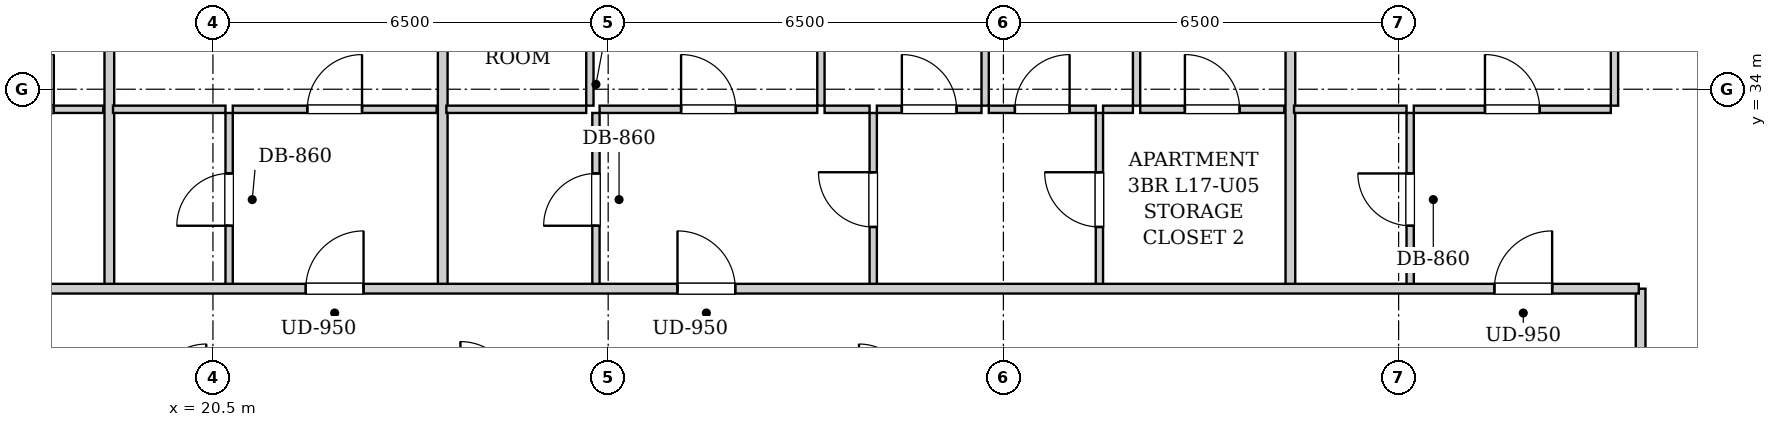
"""IFC4 building model, lengths in metres.
Left out: names, types, materials, properties, quantities, classifications, styles, units other than length and angle.
Written with IfcOpenShell. Run it as: python <this file> out.ifc"""

import sys

from ifc_helpers import new_model, si_unit, direction, frame, frame_2d, origin, place, context, subcontext, project, spatial, rectangle, extrude, element, fill, save


model = new_model("IFC4")
c1 = context("Model", 3, precision=1e-05, world=origin(), true_north=direction((0.0, 1.0)))
c2 = subcontext(c1, "Body", "Model", "MODEL_VIEW")
j1 = project(units=[si_unit("LENGTHUNIT", "METRE"), si_unit("PLANEANGLEUNIT", "RADIAN")], contexts=[c1])
p1 = place(None, origin())
s1 = spatial("IfcSite", under=j1, at=p1, CompositionType="ELEMENT")
p2 = place(p1, origin())
s2 = spatial("IfcBuilding", under=s1, at=p2, CompositionType="ELEMENT")
p3 = place(p2, frame((0.0, 0.0, 64.2)))
s3 = spatial("IfcBuildingStorey", under=s2, at=p3, CompositionType="ELEMENT", Elevation=64.2)
p4 = place(p3, frame((43.98, 28.98, 0.0), z_axis=(0.0, 0.0, 1.0), x_axis=(0.0, 1.0, 0.0)))
e1 = element("IfcWall", 1, at=p4, inside=s3, PredefinedType="PARTITIONING", context=c2, shape_type="SweptSolid", body=[
    extrude(rectangle(XDim=1.74, YDim=0.16, at=frame_2d((0.87, 0.0))), origin(), (0.0, 0.0, 1.0), 2.94),
])
p5 = place(p3, frame((16.17, 33.67, 0.0), z_axis=(0.0, 0.0, 1.0), x_axis=(1.0, 0.0, 0.0)))
e2 = element("IfcWall", 2, at=p5, inside=s3, PredefinedType="PARTITIONING", context=c2, shape_type="SweptSolid", body=[
    extrude(rectangle(XDim=2.526, YDim=0.12, at=frame_2d((1.263, 0.0))), origin(), (0.0, 0.0, 1.0), 2.94),
])
p6 = place(p5, frame((0.813, 0.0, 0.0)))
e3 = element("IfcOpeningElement", 3, at=p6, cuts=e2, PredefinedType="OPENING", context=c2, shape_type="SweptSolid", body=[
    extrude(rectangle(XDim=0.9, YDim=2.05, at=frame_2d((0.45, 1.025))), frame((0.0, 0.07, 0.0), z_axis=(0.0, -1.0, 0.0), x_axis=(1.0, 0.0, 0.0)), (0.0, 0.0, 1.0), 0.14),
])
p7 = place(p3, frame((18.796, 30.76, 0.0), z_axis=(0.0, 0.0, 1.0), x_axis=(0.0, 1.0, 0.0)))
e4 = element("IfcWall", 4, at=p7, inside=s3, PredefinedType="PARTITIONING", context=c2, shape_type="SweptSolid", body=[
    extrude(rectangle(XDim=16.56, YDim=0.16, at=frame_2d((8.28, 0.0))), origin(), (0.0, 0.0, 1.0), 2.94),
])
p8 = place(p3, frame((20.766, 30.76, 0.0), z_axis=(0.0, 0.0, 1.0), x_axis=(0.0, 1.0, 0.0)))
e5 = element("IfcWall", 5, at=p8, inside=s3, PredefinedType="PARTITIONING", context=c2, shape_type="SweptSolid", body=[
    extrude(rectangle(XDim=2.85, YDim=0.12, at=frame_2d((1.425, 0.0))), origin(), (0.0, 0.0, 1.0), 2.94),
])
p9 = place(p8, frame((0.995, 0.0, 0.0)))
e6 = element("IfcOpeningElement", 6, at=p9, cuts=e5, PredefinedType="OPENING", context=c2, shape_type="SweptSolid", body=[
    extrude(rectangle(XDim=0.86, YDim=2.05, at=frame_2d((0.43, 1.025))), frame((0.0, 0.07, 0.0), z_axis=(0.0, -1.0, 0.0), x_axis=(1.0, 0.0, 0.0)), (0.0, 0.0, 1.0), 0.14),
])
p10 = place(p3, frame((18.856, 33.67, 0.0), z_axis=(0.0, 0.0, 1.0), x_axis=(1.0, 0.0, 0.0)))
e7 = element("IfcWall", 7, at=p10, inside=s3, PredefinedType="PARTITIONING", context=c2, shape_type="SweptSolid", body=[
    extrude(rectangle(XDim=1.85, YDim=0.12, at=frame_2d((0.925, 0.0))), origin(), (0.0, 0.0, 1.0), 2.94),
])
p11 = place(p3, frame((20.826, 33.67, 0.0), z_axis=(0.0, 0.0, 1.0), x_axis=(1.0, 0.0, 0.0)))
e8 = element("IfcWall", 8, at=p11, inside=s3, PredefinedType="PARTITIONING", context=c2, shape_type="SweptSolid", body=[
    extrude(rectangle(XDim=3.353, YDim=0.12, at=frame_2d((1.677, 0.0))), origin(), (0.0, 0.0, 1.0), 2.94),
])
p12 = place(p11, frame((1.226, 0.0, 0.0)))
e9 = element("IfcOpeningElement", 9, at=p12, cuts=e8, PredefinedType="OPENING", context=c2, shape_type="SweptSolid", body=[
    extrude(rectangle(XDim=0.9, YDim=2.05, at=frame_2d((0.45, 1.025))), frame((0.0, 0.07, 0.0), z_axis=(0.0, -1.0, 0.0), x_axis=(1.0, 0.0, 0.0)), (0.0, 0.0, 1.0), 0.14),
])
p13 = place(p3, frame((24.279, 30.76, 0.0), z_axis=(0.0, 0.0, 1.0), x_axis=(0.0, 1.0, 0.0)))
e10 = element("IfcWall", 10, at=p13, inside=s3, PredefinedType="PARTITIONING", context=c2, shape_type="SweptSolid", body=[
    extrude(rectangle(XDim=16.56, YDim=0.16, at=frame_2d((8.28, 0.0))), origin(), (0.0, 0.0, 1.0), 2.94),
])
p14 = place(p3, frame((26.799, 30.76, 0.0), z_axis=(0.0, 0.0, 1.0), x_axis=(0.0, 1.0, 0.0)))
e11 = element("IfcWall", 11, at=p14, inside=s3, PredefinedType="PARTITIONING", context=c2, shape_type="SweptSolid", body=[
    extrude(rectangle(XDim=2.85, YDim=0.12, at=frame_2d((1.425, 0.0))), origin(), (0.0, 0.0, 1.0), 2.94),
])
p15 = place(p14, frame((0.995, 0.0, 0.0)))
e12 = element("IfcOpeningElement", 12, at=p15, cuts=e11, PredefinedType="OPENING", context=c2, shape_type="SweptSolid", body=[
    extrude(rectangle(XDim=0.86, YDim=2.05, at=frame_2d((0.43, 1.025))), frame((0.0, 0.07, 0.0), z_axis=(0.0, -1.0, 0.0), x_axis=(1.0, 0.0, 0.0)), (0.0, 0.0, 1.0), 0.14),
])
p16 = place(p3, frame((24.339, 33.67, 0.0), z_axis=(0.0, 0.0, 1.0), x_axis=(1.0, 0.0, 0.0)))
e13 = element("IfcWall", 13, at=p16, inside=s3, PredefinedType="PARTITIONING", context=c2, shape_type="SweptSolid", body=[
    extrude(rectangle(XDim=2.3, YDim=0.12, at=frame_2d((1.15, 0.0))), origin(), (0.0, 0.0, 1.0), 2.94),
])
p17 = place(p3, frame((31.359, 30.76, 0.0), z_axis=(0.0, 0.0, 1.0), x_axis=(0.0, 1.0, 0.0)))
e14 = element("IfcWall", 14, at=p17, inside=s3, PredefinedType="PARTITIONING", context=c2, shape_type="SweptSolid", body=[
    extrude(rectangle(XDim=2.85, YDim=0.12, at=frame_2d((1.425, 0.0))), origin(), (0.0, 0.0, 1.0), 2.94),
])
p18 = place(p17, frame((0.975, 0.0, 0.0)))
e15 = element("IfcOpeningElement", 15, at=p18, cuts=e14, PredefinedType="OPENING", context=c2, shape_type="SweptSolid", body=[
    extrude(rectangle(XDim=0.9, YDim=2.05, at=frame_2d((0.45, 1.025))), frame((0.0, 0.07, 0.0), z_axis=(0.0, -1.0, 0.0), x_axis=(1.0, 0.0, 0.0)), (0.0, 0.0, 1.0), 0.14),
])
p19 = place(p3, frame((26.859, 33.67, 0.0), z_axis=(0.0, 0.0, 1.0), x_axis=(1.0, 0.0, 0.0)))
e16 = element("IfcWall", 16, at=p19, inside=s3, PredefinedType="PARTITIONING", context=c2, shape_type="SweptSolid", body=[
    extrude(rectangle(XDim=3.58, YDim=0.12, at=frame_2d((1.79, 0.0))), origin(), (0.0, 0.0, 1.0), 2.94),
])
p20 = place(p19, frame((1.34, 0.0, 0.0)))
e17 = element("IfcOpeningElement", 17, at=p20, cuts=e16, PredefinedType="OPENING", context=c2, shape_type="SweptSolid", body=[
    extrude(rectangle(XDim=0.9, YDim=2.05, at=frame_2d((0.45, 1.025))), frame((0.0, 0.07, 0.0), z_axis=(0.0, -1.0, 0.0), x_axis=(1.0, 0.0, 0.0)), (0.0, 0.0, 1.0), 0.14),
])
p21 = place(p3, frame((30.559, 33.67, 0.0), z_axis=(0.0, 0.0, 1.0), x_axis=(1.0, 0.0, 0.0)))
e18 = element("IfcWall", 18, at=p21, inside=s3, PredefinedType="PARTITIONING", context=c2, shape_type="SweptSolid", body=[
    extrude(rectangle(XDim=0.74, YDim=0.12, at=frame_2d((0.37, 0.0))), origin(), (0.0, 0.0, 1.0), 2.94),
])
p22 = place(p3, frame((35.079, 30.76, 0.0), z_axis=(0.0, 0.0, 1.0), x_axis=(0.0, 1.0, 0.0)))
e19 = element("IfcWall", 19, at=p22, inside=s3, PredefinedType="PARTITIONING", context=c2, shape_type="SweptSolid", body=[
    extrude(rectangle(XDim=2.85, YDim=0.12, at=frame_2d((1.425, 0.0))), origin(), (0.0, 0.0, 1.0), 2.94),
])
p23 = place(p22, frame((0.975, 0.0, 0.0)))
e20 = element("IfcOpeningElement", 20, at=p23, cuts=e19, PredefinedType="OPENING", context=c2, shape_type="SweptSolid", body=[
    extrude(rectangle(XDim=0.9, YDim=2.05, at=frame_2d((0.45, 1.025))), frame((0.0, 0.07, 0.0), z_axis=(0.0, -1.0, 0.0), x_axis=(1.0, 0.0, 0.0)), (0.0, 0.0, 1.0), 0.14),
])
p24 = place(p3, frame((31.419, 33.67, 0.0), z_axis=(0.0, 0.0, 1.0), x_axis=(1.0, 0.0, 0.0)))
e21 = element("IfcWall", 21, at=p24, inside=s3, PredefinedType="PARTITIONING", context=c2, shape_type="SweptSolid", body=[
    extrude(rectangle(XDim=1.721, YDim=0.12, at=frame_2d((0.86, 0.0))), origin(), (0.0, 0.0, 1.0), 2.94),
])
p25 = place(p24, frame((0.411, 0.0, 0.0)))
e22 = element("IfcOpeningElement", 22, at=p25, cuts=e21, PredefinedType="OPENING", context=c2, shape_type="SweptSolid", body=[
    extrude(rectangle(XDim=0.9, YDim=2.05, at=frame_2d((0.45, 1.025))), frame((0.0, 0.07, 0.0), z_axis=(0.0, -1.0, 0.0), x_axis=(1.0, 0.0, 0.0)), (0.0, 0.0, 1.0), 0.14),
])
p26 = place(p3, frame((33.26, 33.67, 0.0), z_axis=(0.0, 0.0, 1.0), x_axis=(1.0, 0.0, 0.0)))
e23 = element("IfcWall", 23, at=p26, inside=s3, PredefinedType="PARTITIONING", context=c2, shape_type="SweptSolid", body=[
    extrude(rectangle(XDim=1.759, YDim=0.12, at=frame_2d((0.879, 0.0))), origin(), (0.0, 0.0, 1.0), 2.94),
])
p27 = place(p26, frame((0.429, 0.0, 0.0)))
e24 = element("IfcOpeningElement", 24, at=p27, cuts=e23, PredefinedType="OPENING", context=c2, shape_type="SweptSolid", body=[
    extrude(rectangle(XDim=0.9, YDim=2.05, at=frame_2d((0.45, 1.025))), frame((0.0, 0.07, 0.0), z_axis=(0.0, -1.0, 0.0), x_axis=(1.0, 0.0, 0.0)), (0.0, 0.0, 1.0), 0.14),
])
p28 = place(p3, frame((35.139, 33.67, 0.0), z_axis=(0.0, 0.0, 1.0), x_axis=(1.0, 0.0, 0.0)))
e25 = element("IfcWall", 25, at=p28, inside=s3, PredefinedType="PARTITIONING", context=c2, shape_type="SweptSolid", body=[
    extrude(rectangle(XDim=0.491, YDim=0.12, at=frame_2d((0.246, 0.0))), origin(), (0.0, 0.0, 1.0), 2.94),
])
p29 = place(p3, frame((35.75, 33.67, 0.0), z_axis=(0.0, 0.0, 1.0), x_axis=(1.0, 0.0, 0.0)))
e26 = element("IfcWall", 26, at=p29, inside=s3, PredefinedType="PARTITIONING", context=c2, shape_type="SweptSolid", body=[
    extrude(rectangle(XDim=2.37, YDim=0.12, at=frame_2d((1.185, 0.0))), origin(), (0.0, 0.0, 1.0), 2.94),
])
p30 = place(p29, frame((0.735, 0.0, 0.0)))
e27 = element("IfcOpeningElement", 27, at=p30, cuts=e26, PredefinedType="OPENING", context=c2, shape_type="SweptSolid", body=[
    extrude(rectangle(XDim=0.9, YDim=2.05, at=frame_2d((0.45, 1.025))), frame((0.0, 0.07, 0.0), z_axis=(0.0, -1.0, 0.0), x_axis=(1.0, 0.0, 0.0)), (0.0, 0.0, 1.0), 0.14),
])
p31 = place(p3, frame((26.699, 33.73, 0.0), z_axis=(0.0, 0.0, 1.0), x_axis=(0.0, 1.0, 0.0)))
e28 = element("IfcWall", 28, at=p31, inside=s3, PredefinedType="PARTITIONING", context=c2, shape_type="SweptSolid", body=[
    extrude(rectangle(XDim=13.59, YDim=0.12, at=frame_2d((6.795, 0.0))), origin(), (0.0, 0.0, 1.0), 2.94),
])
p32 = place(p31, frame((6.33, 0.0, 0.0)))
e29 = element("IfcOpeningElement", 29, at=p32, cuts=e28, PredefinedType="OPENING", context=c2, shape_type="SweptSolid", body=[
    extrude(rectangle(XDim=0.9, YDim=2.05, at=frame_2d((0.45, 1.025))), frame((0.0, 0.07, 0.0), z_axis=(0.0, -1.0, 0.0), x_axis=(1.0, 0.0, 0.0)), (0.0, 0.0, 1.0), 0.14),
])
p33 = place(p3, frame((30.499, 33.73, 0.0), z_axis=(0.0, 0.0, 1.0), x_axis=(0.0, 1.0, 0.0)))
e30 = element("IfcWall", 30, at=p33, inside=s3, PredefinedType="PARTITIONING", context=c2, shape_type="SweptSolid", body=[
    extrude(rectangle(XDim=13.59, YDim=0.12, at=frame_2d((6.795, 0.0))), origin(), (0.0, 0.0, 1.0), 2.94),
])
p34 = place(p33, frame((6.33, 0.0, 0.0)))
e31 = element("IfcOpeningElement", 31, at=p34, cuts=e30, PredefinedType="OPENING", context=c2, shape_type="SweptSolid", body=[
    extrude(rectangle(XDim=0.9, YDim=2.05, at=frame_2d((0.45, 1.025))), frame((0.0, 0.07, 0.0), z_axis=(0.0, -1.0, 0.0), x_axis=(1.0, 0.0, 0.0)), (0.0, 0.0, 1.0), 0.14),
])
p35 = place(p3, frame((33.2, 33.73, 0.0), z_axis=(0.0, 0.0, 1.0), x_axis=(0.0, 1.0, 0.0)))
e32 = element("IfcWall", 32, at=p35, inside=s3, PredefinedType="PARTITIONING", context=c2, shape_type="SweptSolid", body=[
    extrude(rectangle(XDim=13.59, YDim=0.12, at=frame_2d((6.795, 0.0))), origin(), (0.0, 0.0, 1.0), 2.232),
])
p36 = place(p35, frame((6.33, 0.0, 0.0)))
e33 = element("IfcOpeningElement", 33, at=p36, cuts=e32, PredefinedType="OPENING", context=c2, shape_type="SweptSolid", body=[
    extrude(rectangle(XDim=0.9, YDim=2.05, at=frame_2d((0.45, 1.025))), frame((0.0, 0.07, 0.0), z_axis=(0.0, -1.0, 0.0), x_axis=(1.0, 0.0, 0.0)), (0.0, 0.0, 1.0), 0.14),
])
p37 = place(p3, frame((35.69, 33.73, 0.0), z_axis=(0.0, 0.0, 1.0), x_axis=(0.0, 1.0, 0.0)))
e34 = element("IfcWall", 34, at=p37, inside=s3, PredefinedType="PARTITIONING", context=c2, shape_type="SweptSolid", body=[
    extrude(rectangle(XDim=13.59, YDim=0.12, at=frame_2d((6.795, 0.0))), origin(), (0.0, 0.0, 1.0), 2.94),
])
p38 = place(p37, frame((6.33, 0.0, 0.0)))
e35 = element("IfcOpeningElement", 35, at=p38, cuts=e34, PredefinedType="OPENING", context=c2, shape_type="SweptSolid", body=[
    extrude(rectangle(XDim=0.9, YDim=2.05, at=frame_2d((0.45, 1.025))), frame((0.0, 0.07, 0.0), z_axis=(0.0, -1.0, 0.0), x_axis=(1.0, 0.0, 0.0)), (0.0, 0.0, 1.0), 0.14),
])
p39 = place(p3, frame((38.22, 30.76, 0.0), z_axis=(0.0, 0.0, 1.0), x_axis=(0.0, 1.0, 0.0)))
e36 = element("IfcWall", 36, at=p39, inside=s3, PredefinedType="PARTITIONING", context=c2, shape_type="SweptSolid", body=[
    extrude(rectangle(XDim=14.58, YDim=0.16, at=frame_2d((7.29, 0.0))), origin(), (0.0, 0.0, 1.0), 2.94),
])
p40 = place(p3, frame((40.19, 30.76, 0.0), z_axis=(0.0, 0.0, 1.0), x_axis=(0.0, 1.0, 0.0)))
e37 = element("IfcWall", 37, at=p40, inside=s3, PredefinedType="PARTITIONING", context=c2, shape_type="SweptSolid", body=[
    extrude(rectangle(XDim=2.85, YDim=0.12, at=frame_2d((1.425, 0.0))), origin(), (0.0, 0.0, 1.0), 2.94),
])
p41 = place(p40, frame((0.995, 0.0, 0.0)))
e38 = element("IfcOpeningElement", 38, at=p41, cuts=e37, PredefinedType="OPENING", context=c2, shape_type="SweptSolid", body=[
    extrude(rectangle(XDim=0.86, YDim=2.05, at=frame_2d((0.43, 1.025))), frame((0.0, 0.07, 0.0), z_axis=(0.0, -1.0, 0.0), x_axis=(1.0, 0.0, 0.0)), (0.0, 0.0, 1.0), 0.14),
])
p42 = place(p3, frame((38.28, 33.67, 0.0), z_axis=(0.0, 0.0, 1.0), x_axis=(1.0, 0.0, 0.0)))
e39 = element("IfcWall", 39, at=p42, inside=s3, PredefinedType="PARTITIONING", context=c2, shape_type="SweptSolid", body=[
    extrude(rectangle(XDim=1.85, YDim=0.12, at=frame_2d((0.925, 0.0))), origin(), (0.0, 0.0, 1.0), 2.94),
])
p43 = place(p3, frame((40.25, 33.67, 0.0), z_axis=(0.0, 0.0, 1.0), x_axis=(1.0, 0.0, 0.0)))
e40 = element("IfcWall", 40, at=p43, inside=s3, PredefinedType="PARTITIONING", context=c2, shape_type="SweptSolid", body=[
    extrude(rectangle(XDim=3.24, YDim=0.12, at=frame_2d((1.62, 0.0))), origin(), (0.0, 0.0, 1.0), 2.94),
])
p44 = place(p43, frame((1.17, 0.0, 0.0)))
e41 = element("IfcOpeningElement", 41, at=p44, cuts=e40, PredefinedType="OPENING", context=c2, shape_type="SweptSolid", body=[
    extrude(rectangle(XDim=0.9, YDim=2.05, at=frame_2d((0.45, 1.025))), frame((0.0, 0.07, 0.0), z_axis=(0.0, -1.0, 0.0), x_axis=(1.0, 0.0, 0.0)), (0.0, 0.0, 1.0), 0.14),
])
p45 = place(p3, frame((43.55, 33.73, 0.0), z_axis=(0.0, 0.0, 1.0), x_axis=(0.0, 1.0, 0.0)))
e42 = element("IfcWall", 42, at=p45, inside=s3, PredefinedType="PARTITIONING", context=c2, shape_type="SweptSolid", body=[
    extrude(rectangle(XDim=13.59, YDim=0.12, at=frame_2d((6.795, 0.0))), origin(), (0.0, 0.0, 1.0), 2.94),
])
p46 = place(p45, frame((6.33, 0.0, 0.0)))
e43 = element("IfcOpeningElement", 43, at=p46, cuts=e42, PredefinedType="OPENING", context=c2, shape_type="SweptSolid", body=[
    extrude(rectangle(XDim=0.9, YDim=2.05, at=frame_2d((0.45, 1.025))), frame((0.0, 0.07, 0.0), z_axis=(0.0, -1.0, 0.0), x_axis=(1.0, 0.0, 0.0)), (0.0, 0.0, 1.0), 0.14),
])
p47 = place(p3, frame((10.05, 30.72, 0.0), z_axis=(0.0, 0.0, 1.0), x_axis=(1.0, 0.0, 0.0)))
e44 = element("IfcWall", 44, at=p47, inside=s3, PredefinedType="PARTITIONING", context=c2, shape_type="SweptSolid", body=[
    extrude(rectangle(XDim=33.9, YDim=0.16, at=frame_2d((16.95, 0.0))), origin(), (0.0, 0.0, 1.0), 2.94),
])
p48 = place(p47, frame((3.8, 0.0, 0.0)))
e45 = element("IfcOpeningElement", 45, at=p48, cuts=e44, PredefinedType="OPENING", context=c2, shape_type="SweptSolid", body=[
    extrude(rectangle(XDim=0.95, YDim=2.1, at=frame_2d((0.475, 1.05))), frame((0.0, 0.09, 0.0), z_axis=(0.0, -1.0, 0.0), x_axis=(1.0, 0.0, 0.0)), (0.0, 0.0, 1.0), 0.18),
])
p49 = place(p47, frame((11.977, 0.0, 0.0)))
e46 = element("IfcOpeningElement", 46, at=p49, cuts=e44, PredefinedType="OPENING", context=c2, shape_type="SweptSolid", body=[
    extrude(rectangle(XDim=0.95, YDim=2.1, at=frame_2d((0.475, 1.05))), frame((0.0, 0.09, 0.0), z_axis=(0.0, -1.0, 0.0), x_axis=(1.0, 0.0, 0.0)), (0.0, 0.0, 1.0), 0.18),
])
p50 = place(p47, frame((18.09, 0.0, 0.0)))
e47 = element("IfcOpeningElement", 47, at=p50, cuts=e44, PredefinedType="OPENING", context=c2, shape_type="SweptSolid", body=[
    extrude(rectangle(XDim=0.95, YDim=2.1, at=frame_2d((0.475, 1.05))), frame((0.0, 0.09, 0.0), z_axis=(0.0, -1.0, 0.0), x_axis=(1.0, 0.0, 0.0)), (0.0, 0.0, 1.0), 0.18),
])
p51 = place(p47, frame((31.525, 0.0, 0.0)))
e48 = element("IfcOpeningElement", 48, at=p51, cuts=e44, PredefinedType="OPENING", context=c2, shape_type="SweptSolid", body=[
    extrude(rectangle(XDim=0.95, YDim=2.1, at=frame_2d((0.475, 1.05))), frame((0.0, 0.09, 0.0), z_axis=(0.0, -1.0, 0.0), x_axis=(1.0, 0.0, 0.0)), (0.0, 0.0, 1.0), 0.18),
])
p52 = place(p6, origin())
e49 = element("IfcDoor", 49, at=p52, inside=s3, OperationType="SINGLE_SWING_RIGHT", PredefinedType="DOOR", context=c2, shape_type="SweptSolid", body=[
    extrude(rectangle(XDim=0.9, YDim=2.05, at=frame_2d((0.45, 1.025))), frame((0.0, 0.025, 0.0), z_axis=(0.0, -1.0, 0.0), x_axis=(1.0, 0.0, 0.0)), (0.0, 0.0, 1.0), 0.05),
])
fill(e3, e49)
p53 = place(p9, origin())
e50 = element("IfcDoor", 50, at=p53, inside=s3, OperationType="SINGLE_SWING_LEFT", PredefinedType="DOOR", context=c2, shape_type="SweptSolid", body=[
    extrude(rectangle(XDim=0.86, YDim=2.05, at=frame_2d((0.43, 1.025))), frame((0.0, 0.025, 0.0), z_axis=(0.0, -1.0, 0.0), x_axis=(1.0, 0.0, 0.0)), (0.0, 0.0, 1.0), 0.05),
])
fill(e6, e50)
p54 = place(p12, origin())
e51 = element("IfcDoor", 51, at=p54, inside=s3, OperationType="SINGLE_SWING_RIGHT", PredefinedType="DOOR", context=c2, shape_type="SweptSolid", body=[
    extrude(rectangle(XDim=0.9, YDim=2.05, at=frame_2d((0.45, 1.025))), frame((0.0, 0.025, 0.0), z_axis=(0.0, -1.0, 0.0), x_axis=(1.0, 0.0, 0.0)), (0.0, 0.0, 1.0), 0.05),
])
fill(e9, e51)
p55 = place(p15, origin())
e52 = element("IfcDoor", 52, at=p55, inside=s3, OperationType="SINGLE_SWING_LEFT", PredefinedType="DOOR", context=c2, shape_type="SweptSolid", body=[
    extrude(rectangle(XDim=0.86, YDim=2.05, at=frame_2d((0.43, 1.025))), frame((0.0, 0.025, 0.0), z_axis=(0.0, -1.0, 0.0), x_axis=(1.0, 0.0, 0.0)), (0.0, 0.0, 1.0), 0.05),
])
fill(e12, e52)
p56 = place(p18, origin())
e53 = element("IfcDoor", 53, at=p56, inside=s3, OperationType="SINGLE_SWING_RIGHT", PredefinedType="DOOR", context=c2, shape_type="SweptSolid", body=[
    extrude(rectangle(XDim=0.9, YDim=2.05, at=frame_2d((0.45, 1.025))), frame((0.0, 0.025, 0.0), z_axis=(0.0, -1.0, 0.0), x_axis=(1.0, 0.0, 0.0)), (0.0, 0.0, 1.0), 0.05),
])
fill(e15, e53)
p57 = place(p20, origin())
e54 = element("IfcDoor", 54, at=p57, inside=s3, OperationType="SINGLE_SWING_LEFT", PredefinedType="DOOR", context=c2, shape_type="SweptSolid", body=[
    extrude(rectangle(XDim=0.9, YDim=2.05, at=frame_2d((0.45, 1.025))), frame((0.0, 0.025, 0.0), z_axis=(0.0, -1.0, 0.0), x_axis=(1.0, 0.0, 0.0)), (0.0, 0.0, 1.0), 0.05),
])
fill(e17, e54)
p58 = place(p23, origin())
e55 = element("IfcDoor", 55, at=p58, inside=s3, OperationType="SINGLE_SWING_RIGHT", PredefinedType="DOOR", context=c2, shape_type="SweptSolid", body=[
    extrude(rectangle(XDim=0.9, YDim=2.05, at=frame_2d((0.45, 1.025))), frame((0.0, 0.025, 0.0), z_axis=(0.0, -1.0, 0.0), x_axis=(1.0, 0.0, 0.0)), (0.0, 0.0, 1.0), 0.05),
])
fill(e20, e55)
p59 = place(p25, origin())
e56 = element("IfcDoor", 56, at=p59, inside=s3, OperationType="SINGLE_SWING_LEFT", PredefinedType="DOOR", context=c2, shape_type="SweptSolid", body=[
    extrude(rectangle(XDim=0.9, YDim=2.05, at=frame_2d((0.45, 1.025))), frame((0.0, 0.025, 0.0), z_axis=(0.0, -1.0, 0.0), x_axis=(1.0, 0.0, 0.0)), (0.0, 0.0, 1.0), 0.05),
])
fill(e22, e56)
p60 = place(p27, origin())
e57 = element("IfcDoor", 57, at=p60, inside=s3, OperationType="SINGLE_SWING_RIGHT", PredefinedType="DOOR", context=c2, shape_type="SweptSolid", body=[
    extrude(rectangle(XDim=0.9, YDim=2.05, at=frame_2d((0.45, 1.025))), frame((0.0, 0.025, 0.0), z_axis=(0.0, -1.0, 0.0), x_axis=(1.0, 0.0, 0.0)), (0.0, 0.0, 1.0), 0.05),
])
fill(e24, e57)
p61 = place(p30, origin())
e58 = element("IfcDoor", 58, at=p61, inside=s3, OperationType="SINGLE_SWING_LEFT", PredefinedType="DOOR", context=c2, shape_type="SweptSolid", body=[
    extrude(rectangle(XDim=0.9, YDim=2.05, at=frame_2d((0.45, 1.025))), frame((0.0, 0.025, 0.0), z_axis=(0.0, -1.0, 0.0), x_axis=(1.0, 0.0, 0.0)), (0.0, 0.0, 1.0), 0.05),
])
fill(e27, e58)
p62 = place(p41, origin())
e59 = element("IfcDoor", 59, at=p62, inside=s3, OperationType="SINGLE_SWING_RIGHT", PredefinedType="DOOR", context=c2, shape_type="SweptSolid", body=[
    extrude(rectangle(XDim=0.86, YDim=2.05, at=frame_2d((0.43, 1.025))), frame((0.0, 0.025, 0.0), z_axis=(0.0, -1.0, 0.0), x_axis=(1.0, 0.0, 0.0)), (0.0, 0.0, 1.0), 0.05),
])
fill(e38, e59)
p63 = place(p44, origin())
e60 = element("IfcDoor", 60, at=p63, inside=s3, OperationType="SINGLE_SWING_LEFT", PredefinedType="DOOR", context=c2, shape_type="SweptSolid", body=[
    extrude(rectangle(XDim=0.9, YDim=2.05, at=frame_2d((0.45, 1.025))), frame((0.0, 0.025, 0.0), z_axis=(0.0, -1.0, 0.0), x_axis=(1.0, 0.0, 0.0)), (0.0, 0.0, 1.0), 0.05),
])
fill(e41, e60)
p64 = place(p49, origin())
e61 = element("IfcDoor", 61, at=p64, inside=s3, OperationType="SINGLE_SWING_RIGHT", PredefinedType="DOOR", context=c2, shape_type="SweptSolid", body=[
    extrude(rectangle(XDim=0.95, YDim=2.1, at=frame_2d((0.475, 1.05))), frame((0.0, 0.025, 0.0), z_axis=(0.0, -1.0, 0.0), x_axis=(1.0, 0.0, 0.0)), (0.0, 0.0, 1.0), 0.05),
])
fill(e46, e61)
p65 = place(p50, origin())
e62 = element("IfcDoor", 62, at=p65, inside=s3, OperationType="SINGLE_SWING_LEFT", PredefinedType="DOOR", context=c2, shape_type="SweptSolid", body=[
    extrude(rectangle(XDim=0.95, YDim=2.1, at=frame_2d((0.475, 1.05))), frame((0.0, 0.025, 0.0), z_axis=(0.0, -1.0, 0.0), x_axis=(1.0, 0.0, 0.0)), (0.0, 0.0, 1.0), 0.05),
])
fill(e47, e62)
p66 = place(p51, origin())
e63 = element("IfcDoor", 63, at=p66, inside=s3, OperationType="SINGLE_SWING_RIGHT", PredefinedType="DOOR", context=c2, shape_type="SweptSolid", body=[
    extrude(rectangle(XDim=0.95, YDim=2.1, at=frame_2d((0.475, 1.05))), frame((0.0, 0.025, 0.0), z_axis=(0.0, -1.0, 0.0), x_axis=(1.0, 0.0, 0.0)), (0.0, 0.0, 1.0), 0.05),
])
fill(e48, e63)
save(model, sys.argv[1])
